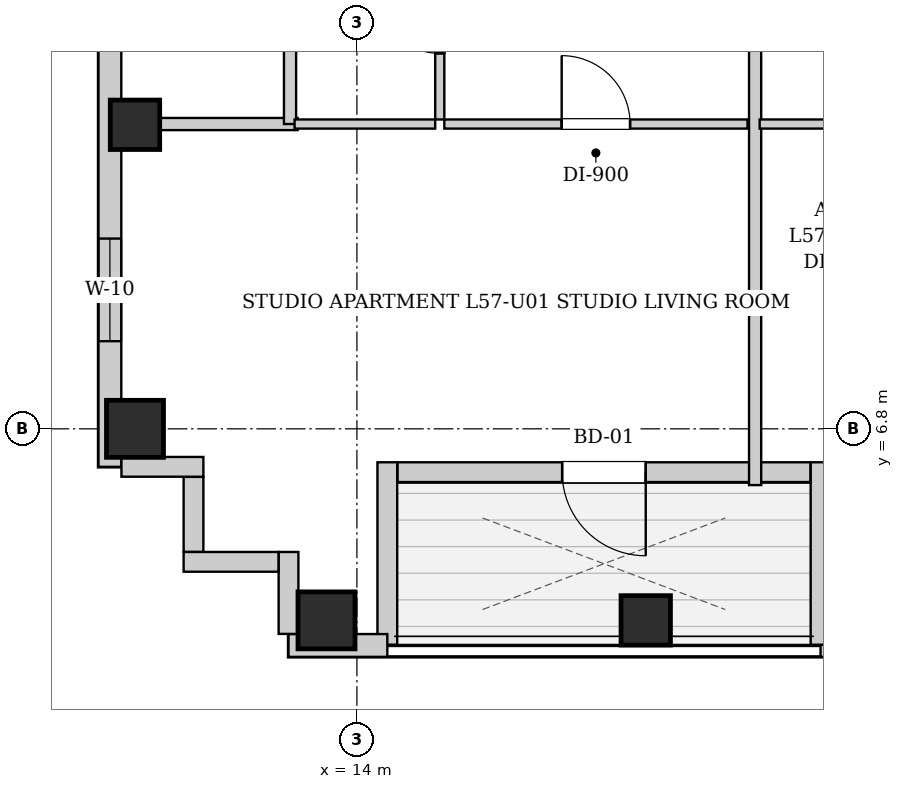
"""IFC4 building model, lengths in metres.
Left out: names, types, materials, properties, quantities, classifications, styles, units other than length and angle.
Written with IfcOpenShell. Run it as: python <this file> out.ifc"""

import sys

from ifc_helpers import new_model, si_unit, direction, frame, frame_2d, origin, origin_2d, place, context, subcontext, project, spatial, rectangle, extrude, element, fill, save


model = new_model("IFC4")
c1 = context("Model", 3, precision=1e-05, world=origin(), true_north=direction((0.0, 1.0)))
c2 = subcontext(c1, "Body", "Model", "MODEL_VIEW")
j1 = project(units=[si_unit("LENGTHUNIT", "METRE"), si_unit("PLANEANGLEUNIT", "RADIAN")], contexts=[c1])
p1 = place(None, origin())
s1 = spatial("IfcSite", under=j1, at=p1, CompositionType="ELEMENT")
p2 = place(p1, origin())
s2 = spatial("IfcBuilding", under=s1, at=p2, CompositionType="ELEMENT")
p3 = place(p2, frame((0.0, 0.0, 197.5)))
s3 = spatial("IfcBuildingStorey", under=s2, at=p3, CompositionType="ELEMENT", Elevation=197.5)
p4 = place(p3, frame((13.6, 4.28, 0.0), z_axis=(0.0, 0.0, 1.0), x_axis=(1.0, 0.0, 0.0)))
e1 = element("IfcColumn", 1, at=p4, inside=s3, PredefinedType="COLUMN", context=c2, shape_type="SweptSolid", body=[
    extrude(rectangle(XDim=0.75, YDim=0.75, at=origin_2d()), origin(), (0.0, 0.0, 1.0), 3.3),
])
p5 = place(p3, frame((17.8, 4.28, 0.0), z_axis=(0.0, 0.0, 1.0), x_axis=(1.0, 0.0, 0.0)))
e2 = element("IfcColumn", 2, at=p5, inside=s3, PredefinedType="COLUMN", context=c2, shape_type="SweptSolid", body=[
    extrude(rectangle(XDim=0.65, YDim=0.65, at=origin_2d()), origin(), (0.0, 0.0, 1.0), 3.3),
])
p6 = place(p3, frame((11.08, 6.8, 0.0), z_axis=(0.0, 0.0, 1.0), x_axis=(1.0, 0.0, 0.0)))
e3 = element("IfcColumn", 3, at=p6, inside=s3, PredefinedType="COLUMN", context=c2, shape_type="SweptSolid", body=[
    extrude(rectangle(XDim=0.75, YDim=0.75, at=origin_2d()), origin(), (0.0, 0.0, 1.0), 3.3),
])
p7 = place(p3, frame((11.08, 10.8, 0.0), z_axis=(0.0, 0.0, 1.0), x_axis=(1.0, 0.0, 0.0)))
e4 = element("IfcColumn", 4, at=p7, inside=s3, PredefinedType="COLUMN", context=c2, shape_type="SweptSolid", body=[
    extrude(rectangle(XDim=0.65, YDim=0.65, at=origin_2d()), origin(), (0.0, 0.0, 1.0), 3.3),
])
p8 = place(p3, frame((31.5, 3.95, 0.0), z_axis=(0.0, 0.0, 1.0), x_axis=(-1.0, 0.0, 0.0)))
e5 = element("IfcWall", 5, at=p8, inside=s3, PredefinedType="SOLIDWALL", context=c2, shape_type="SweptSolid", body=[
    extrude(rectangle(XDim=11.4, YDim=0.3, at=frame_2d((5.7, 0.0))), origin(), (0.0, 0.0, 1.0), 3.04),
])
p9 = place(p8, frame((9.45, 0.0, 0.55)))
e6 = element("IfcOpeningElement", 6, at=p9, cuts=e5, PredefinedType="OPENING", context=c2, shape_type="SweptSolid", body=[
    extrude(rectangle(XDim=1.35, YDim=1.2, at=frame_2d((0.675, 0.6))), frame((0.0, 0.16, 0.0), z_axis=(0.0, -1.0, 0.0), x_axis=(1.0, 0.0, 0.0)), (0.0, 0.0, 1.0), 0.32),
])
p10 = place(p8, frame((3.15, 0.0, 0.55)))
e7 = element("IfcOpeningElement", 7, at=p10, cuts=e5, PredefinedType="OPENING", context=c2, shape_type="SweptSolid", body=[
    extrude(rectangle(XDim=0.85, YDim=1.2, at=frame_2d((0.425, 0.6))), frame((0.0, 0.16, 0.0), z_axis=(0.0, -1.0, 0.0), x_axis=(1.0, 0.0, 0.0)), (0.0, 0.0, 1.0), 0.32),
])
p11 = place(p8, frame((0.75, 0.0, 0.55)))
e8 = element("IfcOpeningElement", 8, at=p11, cuts=e5, PredefinedType="OPENING", context=c2, shape_type="SweptSolid", body=[
    extrude(rectangle(XDim=1.35, YDim=1.2, at=frame_2d((0.675, 0.6))), frame((0.0, 0.16, 0.0), z_axis=(0.0, -1.0, 0.0), x_axis=(1.0, 0.0, 0.0)), (0.0, 0.0, 1.0), 0.32),
])
p12 = place(p3, frame((20.1, 3.96, 0.0), z_axis=(0.0, 0.0, 1.0), x_axis=(0.0, 1.0, 0.0)))
e9 = element("IfcWall", 9, at=p12, inside=s3, PredefinedType="SOLIDWALL", context=c2, shape_type="SweptSolid", body=[
    extrude(rectangle(XDim=2.4, YDim=0.26, at=frame_2d((1.2, 0.0))), origin(), (0.0, 0.0, 1.0), 3.04),
])
p13 = place(p3, frame((19.966, 6.23, 0.0), z_axis=(0.0, 0.0, 1.0), x_axis=(-1.0, 0.0, 0.0)))
e10 = element("IfcWall", 10, at=p13, inside=s3, PredefinedType="SOLIDWALL", context=c2, shape_type="SweptSolid", body=[
    extrude(rectangle(XDim=5.432, YDim=0.26, at=frame_2d((2.716, 0.0))), origin(), (0.0, 0.0, 1.0), 3.04),
])
p14 = place(p13, frame((2.166, 0.0, 0.0)))
e11 = element("IfcOpeningElement", 11, at=p14, cuts=e10, PredefinedType="OPENING", context=c2, shape_type="SweptSolid", body=[
    extrude(rectangle(XDim=1.1, YDim=2.0, at=frame_2d((0.55, 1.0))), frame((0.0, 0.14, 0.0), z_axis=(0.0, -1.0, 0.0), x_axis=(1.0, 0.0, 0.0)), (0.0, 0.0, 1.0), 0.28),
])
p15 = place(p3, frame((14.4, 6.36, 0.0), z_axis=(0.0, 0.0, 1.0), x_axis=(0.0, -1.0, 0.0)))
e12 = element("IfcWall", 12, at=p15, inside=s3, PredefinedType="SOLIDWALL", context=c2, shape_type="SweptSolid", body=[
    extrude(rectangle(XDim=2.4, YDim=0.26, at=frame_2d((1.2, 0.0))), origin(), (0.0, 0.0, 1.0), 3.04),
])
p16 = place(p3, frame((14.4, 3.95, 0.0), z_axis=(0.0, 0.0, 1.0), x_axis=(-1.0, 0.0, 0.0)))
e13 = element("IfcWall", 13, at=p16, inside=s3, PredefinedType="SOLIDWALL", context=c2, shape_type="SweptSolid", body=[
    extrude(rectangle(XDim=1.3, YDim=0.3, at=frame_2d((0.65, 0.0))), origin(), (0.0, 0.0, 1.0), 3.04),
])
p17 = place(p3, frame((10.75, 6.3, 0.0), z_axis=(0.0, 0.0, 1.0), x_axis=(0.0, 1.0, 0.0)))
e14 = element("IfcWall", 14, at=p17, inside=s3, PredefinedType="SOLIDWALL", context=c2, shape_type="SweptSolid", body=[
    extrude(rectangle(XDim=31.4, YDim=0.3, at=frame_2d((15.7, 0.0))), origin(), (0.0, 0.0, 1.0), 3.04),
])
p18 = place(p17, frame((1.653, 0.0, 0.55)))
e15 = element("IfcOpeningElement", 15, at=p18, cuts=e14, PredefinedType="OPENING", context=c2, shape_type="SweptSolid", body=[
    extrude(rectangle(XDim=1.35, YDim=1.2, at=frame_2d((0.675, 0.6))), frame((0.0, 0.16, 0.0), z_axis=(0.0, -1.0, 0.0), x_axis=(1.0, 0.0, 0.0)), (0.0, 0.0, 1.0), 0.32),
])
p19 = place(p17, frame((28.396, 0.0, 0.55)))
e16 = element("IfcOpeningElement", 16, at=p19, cuts=e14, PredefinedType="OPENING", context=c2, shape_type="SweptSolid", body=[
    extrude(rectangle(XDim=1.35, YDim=1.2, at=frame_2d((0.675, 0.6))), frame((0.0, 0.16, 0.0), z_axis=(0.0, -1.0, 0.0), x_axis=(1.0, 0.0, 0.0)), (0.0, 0.0, 1.0), 0.32),
])
p20 = place(p17, frame((10.367, 0.0, 0.55)))
e17 = element("IfcOpeningElement", 17, at=p20, cuts=e14, PredefinedType="OPENING", context=c2, shape_type="SweptSolid", body=[
    extrude(rectangle(XDim=1.35, YDim=1.2, at=frame_2d((0.675, 0.6))), frame((0.0, 0.16, 0.0), z_axis=(0.0, -1.0, 0.0), x_axis=(1.0, 0.0, 0.0)), (0.0, 0.0, 1.0), 0.32),
])
p21 = place(p17, frame((19.683, 0.0, 0.55)))
e18 = element("IfcOpeningElement", 18, at=p21, cuts=e14, PredefinedType="OPENING", context=c2, shape_type="SweptSolid", body=[
    extrude(rectangle(XDim=1.35, YDim=1.2, at=frame_2d((0.675, 0.6))), frame((0.0, 0.16, 0.0), z_axis=(0.0, -1.0, 0.0), x_axis=(1.0, 0.0, 0.0)), (0.0, 0.0, 1.0), 0.32),
])
p22 = place(p3, frame((13.1, 4.102, 0.0), z_axis=(0.0, 0.0, 1.0), x_axis=(0.0, 1.0, 0.0)))
e19 = element("IfcWall", 19, at=p22, inside=s3, PredefinedType="SOLIDWALL", context=c2, shape_type="SweptSolid", body=[
    extrude(rectangle(XDim=1.078, YDim=0.26, at=frame_2d((0.539, 0.0))), origin(), (0.0, 0.0, 1.0), 3.04),
])
p23 = place(p3, frame((12.968, 5.05, 0.0), z_axis=(0.0, 0.0, 1.0), x_axis=(-1.0, 0.0, 0.0)))
e20 = element("IfcWall", 20, at=p23, inside=s3, PredefinedType="SOLIDWALL", context=c2, shape_type="SweptSolid", body=[
    extrude(rectangle(XDim=1.248, YDim=0.26, at=frame_2d((0.624, 0.0))), origin(), (0.0, 0.0, 1.0), 3.04),
])
p24 = place(p3, frame((11.85, 5.182, 0.0), z_axis=(0.0, 0.0, 1.0), x_axis=(0.0, 1.0, 0.0)))
e21 = element("IfcWall", 21, at=p24, inside=s3, PredefinedType="SOLIDWALL", context=c2, shape_type="SweptSolid", body=[
    extrude(rectangle(XDim=0.986, YDim=0.26, at=frame_2d((0.493, 0.0))), origin(), (0.0, 0.0, 1.0), 3.04),
])
p25 = place(p3, frame((11.98, 6.3, 0.0), z_axis=(0.0, 0.0, 1.0), x_axis=(-1.0, 0.0, 0.0)))
e22 = element("IfcWall", 22, at=p25, inside=s3, PredefinedType="SOLIDWALL", context=c2, shape_type="SweptSolid", body=[
    extrude(rectangle(XDim=1.078, YDim=0.26, at=frame_2d((0.539, 0.0))), origin(), (0.0, 0.0, 1.0), 3.04),
])
p26 = place(p3, frame((10.88, 10.81, 0.0), z_axis=(0.0, 0.0, 1.0), x_axis=(1.0, 0.0, 0.0)))
e23 = element("IfcWall", 23, at=p26, inside=s3, PredefinedType="PARTITIONING", context=c2, shape_type="SweptSolid", body=[
    extrude(rectangle(XDim=2.34, YDim=0.16, at=frame_2d((1.17, 0.0))), origin(), (0.0, 0.0, 1.0), 3.04),
])
p27 = place(p3, frame((13.12, 10.81, 0.0), z_axis=(0.0, 0.0, 1.0), x_axis=(0.0, 1.0, 0.0)))
e24 = element("IfcWall", 24, at=p27, inside=s3, PredefinedType="PARTITIONING", context=c2, shape_type="SweptSolid", body=[
    extrude(rectangle(XDim=2.66, YDim=0.16, at=frame_2d((1.33, 0.0))), origin(), (0.0, 0.0, 1.0), 3.04),
])
p28 = place(p3, frame((15.09, 10.87, 0.0), z_axis=(0.0, 0.0, 1.0), x_axis=(0.0, 1.0, 0.0)))
e25 = element("IfcWall", 25, at=p28, inside=s3, PredefinedType="PARTITIONING", context=c2, shape_type="SweptSolid", body=[
    extrude(rectangle(XDim=2.6, YDim=0.12, at=frame_2d((1.3, 0.0))), origin(), (0.0, 0.0, 1.0), 3.04),
])
p29 = place(p28, frame((0.87, 0.0, 0.0)))
e26 = element("IfcOpeningElement", 26, at=p29, cuts=e25, PredefinedType="OPENING", context=c2, shape_type="SweptSolid", body=[
    extrude(rectangle(XDim=0.86, YDim=2.05, at=frame_2d((0.43, 1.025))), frame((0.0, 0.07, 0.0), z_axis=(0.0, -1.0, 0.0), x_axis=(1.0, 0.0, 0.0)), (0.0, 0.0, 1.0), 0.14),
])
p30 = place(p3, frame((13.18, 10.81, 0.0), z_axis=(0.0, 0.0, 1.0), x_axis=(1.0, 0.0, 0.0)))
e27 = element("IfcWall", 27, at=p30, inside=s3, PredefinedType="PARTITIONING", context=c2, shape_type="SweptSolid", body=[
    extrude(rectangle(XDim=1.85, YDim=0.12, at=frame_2d((0.925, 0.0))), origin(), (0.0, 0.0, 1.0), 3.04),
])
p31 = place(p3, frame((15.15, 10.81, 0.0), z_axis=(0.0, 0.0, 1.0), x_axis=(1.0, 0.0, 0.0)))
e28 = element("IfcWall", 28, at=p31, inside=s3, PredefinedType="PARTITIONING", context=c2, shape_type="SweptSolid", body=[
    extrude(rectangle(XDim=3.989, YDim=0.12, at=frame_2d((1.995, 0.0))), origin(), (0.0, 0.0, 1.0), 3.04),
])
p32 = place(p31, frame((1.544, 0.0, 0.0)))
e29 = element("IfcOpeningElement", 29, at=p32, cuts=e28, PredefinedType="OPENING", context=c2, shape_type="SweptSolid", body=[
    extrude(rectangle(XDim=0.9, YDim=2.05, at=frame_2d((0.45, 1.025))), frame((0.0, 0.07, 0.0), z_axis=(0.0, -1.0, 0.0), x_axis=(1.0, 0.0, 0.0)), (0.0, 0.0, 1.0), 0.14),
])
p33 = place(p3, frame((19.239, 6.06, 0.0), z_axis=(0.0, 0.0, 1.0), x_axis=(0.0, 1.0, 0.0)))
e30 = element("IfcWall", 30, at=p33, inside=s3, PredefinedType="PARTITIONING", context=c2, shape_type="SweptSolid", body=[
    extrude(rectangle(XDim=7.41, YDim=0.16, at=frame_2d((3.705, 0.0))), origin(), (0.0, 0.0, 1.0), 3.04),
])
p34 = place(p3, frame((19.299, 10.81, 0.0), z_axis=(0.0, 0.0, 1.0), x_axis=(1.0, 0.0, 0.0)))
e31 = element("IfcWall", 31, at=p34, inside=s3, PredefinedType="PARTITIONING", context=c2, shape_type="SweptSolid", body=[
    extrude(rectangle(XDim=2.4, YDim=0.12, at=frame_2d((1.2, 0.0))), origin(), (0.0, 0.0, 1.0), 3.04),
])
p35 = place(p29, origin())
e32 = element("IfcDoor", 32, at=p35, inside=s3, OperationType="SINGLE_SWING_RIGHT", PredefinedType="DOOR", context=c2, shape_type="SweptSolid", body=[
    extrude(rectangle(XDim=0.86, YDim=2.05, at=frame_2d((0.43, 1.025))), frame((0.0, 0.025, 0.0), z_axis=(0.0, -1.0, 0.0), x_axis=(1.0, 0.0, 0.0)), (0.0, 0.0, 1.0), 0.05),
])
fill(e26, e32)
p36 = place(p32, origin())
e33 = element("IfcDoor", 33, at=p36, inside=s3, OperationType="SINGLE_SWING_LEFT", PredefinedType="DOOR", context=c2, shape_type="SweptSolid", body=[
    extrude(rectangle(XDim=0.9, YDim=2.05, at=frame_2d((0.45, 1.025))), frame((0.0, 0.025, 0.0), z_axis=(0.0, -1.0, 0.0), x_axis=(1.0, 0.0, 0.0)), (0.0, 0.0, 1.0), 0.05),
])
fill(e29, e33)
p37 = place(p14, origin())
e34 = element("IfcDoor", 34, at=p37, inside=s3, OperationType="SINGLE_SWING_LEFT", PredefinedType="DOOR", context=c2, shape_type="SweptSolid", body=[
    extrude(rectangle(XDim=1.1, YDim=2.0, at=frame_2d((0.55, 1.0))), frame((0.0, 0.025, 0.0), z_axis=(0.0, -1.0, 0.0), x_axis=(1.0, 0.0, 0.0)), (0.0, 0.0, 1.0), 0.05),
])
fill(e11, e34)
p38 = place(p18, origin())
e35 = element("IfcWindow", 35, at=p38, inside=s3, PartitioningType="SINGLE_PANEL", PredefinedType="WINDOW", context=c2, shape_type="SweptSolid", body=[
    extrude(rectangle(XDim=1.35, YDim=1.2, at=frame_2d((0.675, 0.6))), frame((0.0, 0.03, 0.0), z_axis=(0.0, -1.0, 0.0), x_axis=(1.0, 0.0, 0.0)), (0.0, 0.0, 1.0), 0.06),
])
fill(e15, e35)
save(model, sys.argv[1])
